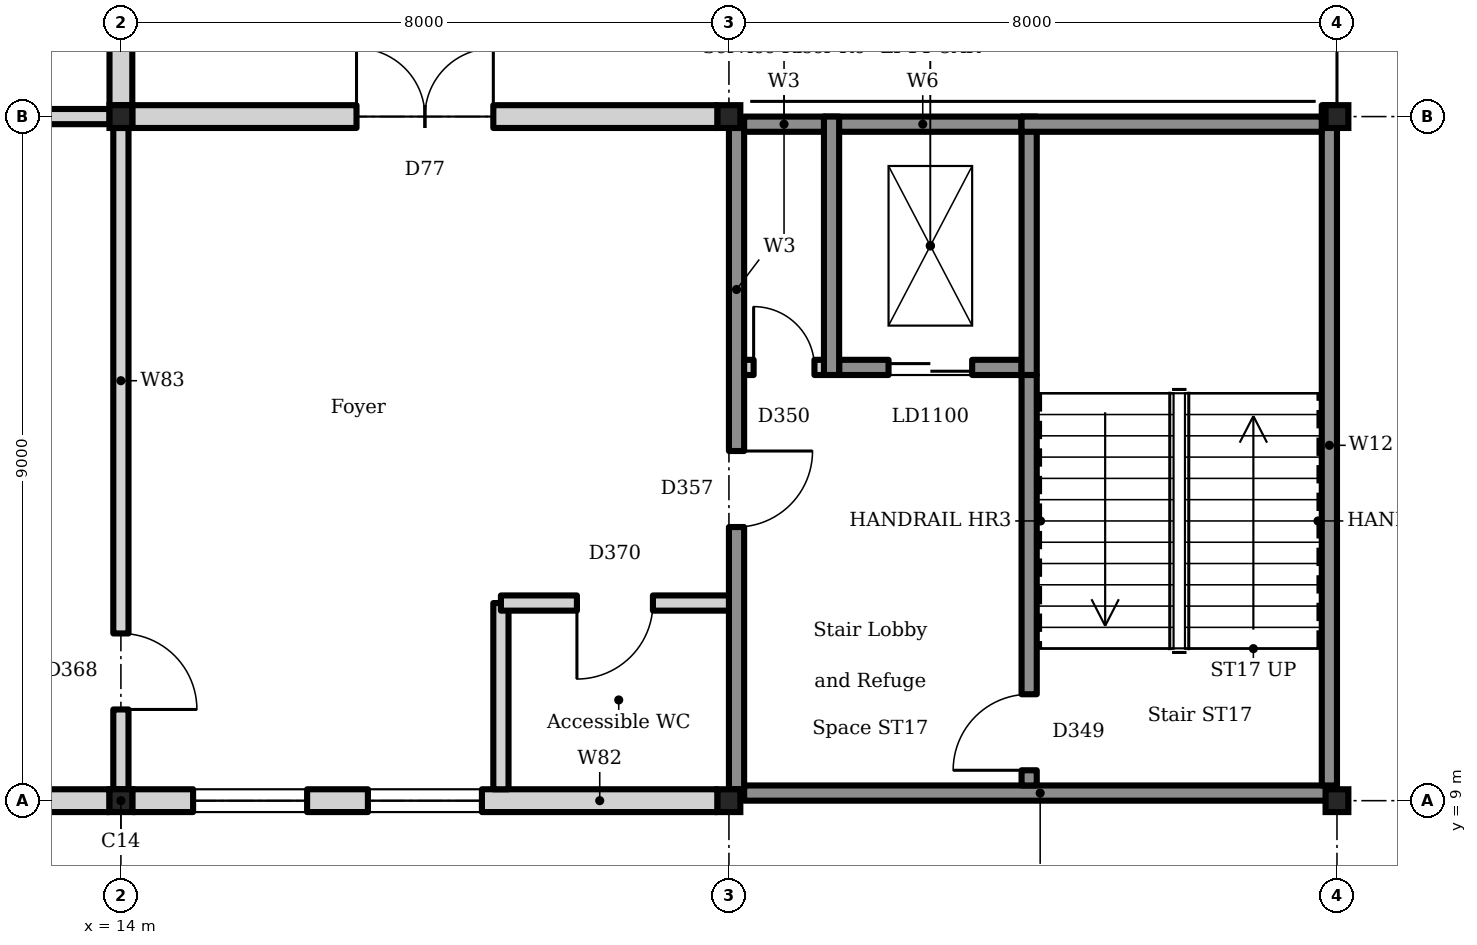
"""IFC4 building model, lengths in metres.
Left out: names, types, materials, properties, quantities, classifications, styles, units other than length and angle.
Written with IfcOpenShell. Run it as: python <this file> out.ifc"""

import sys

from ifc_helpers import new_model, si_unit, direction, frame, frame_2d, origin, origin_2d, place, context, subcontext, project, spatial, rectangle, i_section, extrude, element, fill, save


model = new_model("IFC4")
c1 = context("Model", 3, precision=1e-05, world=origin(), true_north=direction((0.0, 1.0)))
c2 = subcontext(c1, "Body", "Model", "MODEL_VIEW")
j1 = project(units=[si_unit("LENGTHUNIT", "METRE"), si_unit("PLANEANGLEUNIT", "RADIAN")], contexts=[c1])
p1 = place(None, origin())
s1 = spatial("IfcSite", under=j1, at=p1, CompositionType="ELEMENT")
p2 = place(p1, origin())
s2 = spatial("IfcBuilding", under=s1, at=p2, CompositionType="ELEMENT")
p3 = place(p2, frame((0.0, 0.0, 9.9)))
s3 = spatial("IfcBuildingStorey", under=s2, at=p3, CompositionType="ELEMENT", Elevation=9.9)
p4 = place(p3, frame((23.25, 17.9, 0.0), z_axis=(0.0, 0.0, 1.0), x_axis=(1.0, 0.0, 0.0)))
e1 = element("IfcWall", 1, at=p4, inside=s3, PredefinedType="SOLIDWALL", context=c2, shape_type="SweptSolid", body=[
    extrude(rectangle(XDim=2.6, YDim=0.2, at=frame_2d((1.3, 0.0))), origin(), (0.0, 0.0, 1.0), 4.5),
])
p5 = place(p3, frame((23.45, 14.7, 0.0), z_axis=(0.0, 0.0, 1.0), x_axis=(1.0, 0.0, 0.0)))
e2 = element("IfcWall", 2, at=p5, inside=s3, PredefinedType="SOLIDWALL", context=c2, shape_type="SweptSolid", body=[
    extrude(rectangle(XDim=2.4, YDim=0.2, at=frame_2d((1.2, 0.0))), origin(), (0.0, 0.0, 1.0), 4.5),
])
p6 = place(p5, frame((0.65, 0.0, 0.0)))
e3 = element("IfcOpeningElement", 3, at=p6, cuts=e2, PredefinedType="OPENING", context=c2, shape_type="SweptSolid", body=[
    extrude(rectangle(XDim=1.1, YDim=2.1, at=frame_2d((0.55, 1.05))), frame((0.0, 0.11, 0.0), z_axis=(0.0, -1.0, 0.0), x_axis=(1.0, 0.0, 0.0)), (0.0, 0.0, 1.0), 0.22),
])
for number, where, z_axis, x_axis in (
    (4, (23.35, 14.6, 0.0), (0.0, 0.0, 1.0), (0.0, 1.0, 0.0)),
    (5, (25.95, 14.6, 0.0), (0.0, 0.0, 1.0), (0.0, 1.0, 0.0)),
):
    element("IfcWall", number, at=place(p3, frame(where, z_axis=z_axis, x_axis=x_axis)), inside=s3, PredefinedType="SOLIDWALL", context=c2, shape_type="SweptSolid", body=[
        extrude(rectangle(XDim=3.4, YDim=0.2, at=frame_2d((1.7, 0.0))), origin(), (0.0, 0.0, 1.0), 4.5),
    ])
for number, where, z_axis, x_axis in (
    (6, (14.0, 9.0, 0.0), (0.0, 0.0, 1.0), (1.0, 0.0, 0.0)),
    (7, (14.0, 18.0, 0.0), (0.0, 0.0, 1.0), (1.0, 0.0, 0.0)),
):
    element("IfcColumn", number, at=place(p3, frame(where, z_axis=z_axis, x_axis=x_axis)), inside=s3, PredefinedType="COLUMN", context=c2, shape_type="SweptSolid", body=[
        extrude(i_section(OverallWidth=0.3, OverallDepth=0.3, WebThickness=0.011, FlangeThickness=0.019, FilletRadius=0.027, at=origin_2d()), origin(), (0.0, 0.0, 1.0), 4.3),
    ])
for number, where, z_axis, x_axis in (
    (8, (22.0, 9.0, 0.0), (0.0, 0.0, 1.0), (1.0, 0.0, 0.0)),
    (9, (22.0, 18.0, 0.0), (0.0, 0.0, 1.0), (1.0, 0.0, 0.0)),
    (10, (30.0, 9.0, 0.0), (0.0, 0.0, 1.0), (1.0, 0.0, 0.0)),
    (11, (30.0, 18.0, 0.0), (0.0, 0.0, 1.0), (1.0, 0.0, 0.0)),
):
    element("IfcColumn", number, at=place(p3, frame(where, z_axis=z_axis, x_axis=x_axis)), inside=s3, PredefinedType="COLUMN", context=c2, shape_type="SweptSolid", body=[
        extrude(i_section(OverallWidth=0.3, OverallDepth=0.3, WebThickness=0.011, FlangeThickness=0.019, FilletRadius=0.027, at=origin_2d()), origin(), (0.0, 0.0, 1.0), 4.5),
    ])
p7 = place(p3, frame((6.15, 9.0, 0.0), z_axis=(0.0, 0.0, 1.0), x_axis=(1.0, 0.0, 0.0)))
e12 = element("IfcWall", 12, at=p7, inside=s3, PredefinedType="SOLIDWALL", context=c2, shape_type="SweptSolid", body=[
    extrude(rectangle(XDim=7.7, YDim=0.3, at=frame_2d((3.85, 0.0))), origin(), (0.0, 0.0, 1.0), 3.93),
])
p8 = place(p7, frame((0.8, 0.0, 1.1)))
e13 = element("IfcOpeningElement", 13, at=p8, cuts=e12, PredefinedType="OPENING", context=c2, shape_type="SweptSolid", body=[
    extrude(rectangle(XDim=1.5, YDim=2.4, at=frame_2d((0.75, 1.2))), frame((0.0, 0.16, 0.0), z_axis=(0.0, -1.0, 0.0), x_axis=(1.0, 0.0, 0.0)), (0.0, 0.0, 1.0), 0.32),
])
p9 = place(p7, frame((3.1, 0.0, 1.1)))
e14 = element("IfcOpeningElement", 14, at=p9, cuts=e12, PredefinedType="OPENING", context=c2, shape_type="SweptSolid", body=[
    extrude(rectangle(XDim=1.5, YDim=2.4, at=frame_2d((0.75, 1.2))), frame((0.0, 0.16, 0.0), z_axis=(0.0, -1.0, 0.0), x_axis=(1.0, 0.0, 0.0)), (0.0, 0.0, 1.0), 0.32),
])
p10 = place(p7, frame((5.4, 0.0, 1.1)))
e15 = element("IfcOpeningElement", 15, at=p10, cuts=e12, PredefinedType="OPENING", context=c2, shape_type="SweptSolid", body=[
    extrude(rectangle(XDim=1.5, YDim=2.4, at=frame_2d((0.75, 1.2))), frame((0.0, 0.16, 0.0), z_axis=(0.0, -1.0, 0.0), x_axis=(1.0, 0.0, 0.0)), (0.0, 0.0, 1.0), 0.32),
])
p11 = place(p3, frame((14.15, 9.0, 0.0), z_axis=(0.0, 0.0, 1.0), x_axis=(1.0, 0.0, 0.0)))
e16 = element("IfcWall", 16, at=p11, inside=s3, PredefinedType="SOLIDWALL", context=c2, shape_type="SweptSolid", body=[
    extrude(rectangle(XDim=7.7, YDim=0.3, at=frame_2d((3.85, 0.0))), origin(), (0.0, 0.0, 1.0), 3.93),
])
p12 = place(p11, frame((0.8, 0.0, 1.1)))
e17 = element("IfcOpeningElement", 17, at=p12, cuts=e16, PredefinedType="OPENING", context=c2, shape_type="SweptSolid", body=[
    extrude(rectangle(XDim=1.5, YDim=2.4, at=frame_2d((0.75, 1.2))), frame((0.0, 0.16, 0.0), z_axis=(0.0, -1.0, 0.0), x_axis=(1.0, 0.0, 0.0)), (0.0, 0.0, 1.0), 0.32),
])
p13 = place(p11, frame((3.1, 0.0, 1.1)))
e18 = element("IfcOpeningElement", 18, at=p13, cuts=e16, PredefinedType="OPENING", context=c2, shape_type="SweptSolid", body=[
    extrude(rectangle(XDim=1.5, YDim=2.4, at=frame_2d((0.75, 1.2))), frame((0.0, 0.16, 0.0), z_axis=(0.0, -1.0, 0.0), x_axis=(1.0, 0.0, 0.0)), (0.0, 0.0, 1.0), 0.32),
])
p14 = place(p3, frame((14.0, 18.15, 0.0), z_axis=(0.0, 0.0, 1.0), x_axis=(0.0, 1.0, 0.0)))
e19 = element("IfcWall", 19, at=p14, inside=s3, PredefinedType="SOLIDWALL", context=c2, shape_type="SweptSolid", body=[
    extrude(rectangle(XDim=8.7, YDim=0.3, at=frame_2d((4.35, 0.0))), origin(), (0.0, 0.0, 1.0), 3.93),
])
p15 = place(p14, frame((1.05, 0.0, 1.1)))
e20 = element("IfcOpeningElement", 20, at=p15, cuts=e19, PredefinedType="OPENING", context=c2, shape_type="SweptSolid", body=[
    extrude(rectangle(XDim=1.5, YDim=2.4, at=frame_2d((0.75, 1.2))), frame((0.0, 0.16, 0.0), z_axis=(0.0, -1.0, 0.0), x_axis=(1.0, 0.0, 0.0)), (0.0, 0.0, 1.0), 0.32),
])
p16 = place(p14, frame((3.6, 0.0, 1.1)))
e21 = element("IfcOpeningElement", 21, at=p16, cuts=e19, PredefinedType="OPENING", context=c2, shape_type="SweptSolid", body=[
    extrude(rectangle(XDim=1.5, YDim=2.4, at=frame_2d((0.75, 1.2))), frame((0.0, 0.16, 0.0), z_axis=(0.0, -1.0, 0.0), x_axis=(1.0, 0.0, 0.0)), (0.0, 0.0, 1.0), 0.32),
])
p17 = place(p14, frame((6.15, 0.0, 1.1)))
e22 = element("IfcOpeningElement", 22, at=p17, cuts=e19, PredefinedType="OPENING", context=c2, shape_type="SweptSolid", body=[
    extrude(rectangle(XDim=1.5, YDim=2.4, at=frame_2d((0.75, 1.2))), frame((0.0, 0.16, 0.0), z_axis=(0.0, -1.0, 0.0), x_axis=(1.0, 0.0, 0.0)), (0.0, 0.0, 1.0), 0.32),
])
p18 = place(p3, frame((14.15, 18.0, 0.0), z_axis=(0.0, 0.0, 1.0), x_axis=(1.0, 0.0, 0.0)))
e23 = element("IfcWall", 23, at=p18, inside=s3, PredefinedType="SOLIDWALL", context=c2, shape_type="SweptSolid", body=[
    extrude(rectangle(XDim=7.7, YDim=0.3, at=frame_2d((3.85, 0.0))), origin(), (0.0, 0.0, 1.0), 3.93),
])
p19 = place(p18, frame((2.95, 0.0, 0.0)))
e24 = element("IfcOpeningElement", 24, at=p19, cuts=e23, PredefinedType="OPENING", context=c2, shape_type="SweptSolid", body=[
    extrude(rectangle(XDim=1.8, YDim=2.4, at=frame_2d((0.9, 1.2))), frame((0.0, 0.16, 0.0), z_axis=(0.0, -1.0, 0.0), x_axis=(1.0, 0.0, 0.0)), (0.0, 0.0, 1.0), 0.32),
])
p20 = place(p3, frame((22.2, 9.1, 0.0), z_axis=(0.0, 0.0, 1.0), x_axis=(1.0, 0.0, 0.0)))
e25 = element("IfcWall", 25, at=p20, inside=s3, PredefinedType="SOLIDWALL", context=c2, shape_type="SweptSolid", body=[
    extrude(rectangle(XDim=7.79, YDim=0.2, at=frame_2d((3.895, 0.0))), origin(), (0.0, 0.0, 1.0), 4.3),
])
p21 = place(p3, frame((29.9, 9.2, 0.0), z_axis=(0.0, 0.0, 1.0), x_axis=(0.0, 1.0, 0.0)))
e26 = element("IfcWall", 26, at=p21, inside=s3, PredefinedType="SOLIDWALL", context=c2, shape_type="SweptSolid", body=[
    extrude(rectangle(XDim=8.95, YDim=0.2, at=frame_2d((4.475, 0.0))), origin(), (0.0, 0.0, 1.0), 4.3),
])
p22 = place(p3, frame((22.1, 9.15, 0.0), z_axis=(0.0, 0.0, 1.0), x_axis=(0.0, 1.0, 0.0)))
e27 = element("IfcWall", 27, at=p22, inside=s3, PredefinedType="SOLIDWALL", context=c2, shape_type="SweptSolid", body=[
    extrude(rectangle(XDim=8.7, YDim=0.2, at=frame_2d((4.35, 0.0))), origin(), (0.0, 0.0, 1.0), 4.3),
])
p23 = place(p22, frame((3.45, 0.0, 0.0)))
e28 = element("IfcOpeningElement", 28, at=p23, cuts=e27, PredefinedType="OPENING", context=c2, shape_type="SweptSolid", body=[
    extrude(rectangle(XDim=1.0, YDim=2.1, at=frame_2d((0.5, 1.05))), frame((0.0, 0.11, 0.0), z_axis=(0.0, -1.0, 0.0), x_axis=(1.0, 0.0, 0.0)), (0.0, 0.0, 1.0), 0.22),
])
p24 = place(p3, frame((22.2, 17.9, 0.0), z_axis=(0.0, 0.0, 1.0), x_axis=(1.0, 0.0, 0.0)))
e29 = element("IfcWall", 29, at=p24, inside=s3, PredefinedType="SOLIDWALL", context=c2, shape_type="SweptSolid", body=[
    extrude(rectangle(XDim=1.05, YDim=0.2, at=frame_2d((0.525, 0.0))), origin(), (0.0, 0.0, 1.0), 4.3),
])
p25 = place(p3, frame((25.85, 17.9, 0.0), z_axis=(0.0, 0.0, 1.0), x_axis=(1.0, 0.0, 0.0)))
e30 = element("IfcWall", 30, at=p25, inside=s3, PredefinedType="SOLIDWALL", context=c2, shape_type="SweptSolid", body=[
    extrude(rectangle(XDim=3.95, YDim=0.2, at=frame_2d((1.975, 0.0))), origin(), (0.0, 0.0, 1.0), 4.3),
])
p26 = place(p3, frame((25.95, 9.2, 0.0), z_axis=(0.0, 0.0, 1.0), x_axis=(0.0, 1.0, 0.0)))
e31 = element("IfcWall", 31, at=p26, inside=s3, PredefinedType="SOLIDWALL", context=c2, shape_type="SweptSolid", body=[
    extrude(rectangle(XDim=5.4, YDim=0.2, at=frame_2d((2.7, 0.0))), origin(), (0.0, 0.0, 1.0), 4.3),
])
p27 = place(p26, frame((0.2, 0.0, 0.0)))
e32 = element("IfcOpeningElement", 32, at=p27, cuts=e31, PredefinedType="OPENING", context=c2, shape_type="SweptSolid", body=[
    extrude(rectangle(XDim=1.0, YDim=2.1, at=frame_2d((0.5, 1.05))), frame((0.0, 0.11, 0.0), z_axis=(0.0, -1.0, 0.0), x_axis=(1.0, 0.0, 0.0)), (0.0, 0.0, 1.0), 0.22),
])
p28 = place(p3, frame((22.2, 14.7, 0.0), z_axis=(0.0, 0.0, 1.0), x_axis=(1.0, 0.0, 0.0)))
e33 = element("IfcWall", 33, at=p28, inside=s3, PredefinedType="SOLIDWALL", context=c2, shape_type="SweptSolid", body=[
    extrude(rectangle(XDim=1.05, YDim=0.2, at=frame_2d((0.525, 0.0))), origin(), (0.0, 0.0, 1.0), 4.3),
])
p29 = place(p28, frame((0.125, 0.0, 0.0)))
e34 = element("IfcOpeningElement", 34, at=p29, cuts=e33, PredefinedType="OPENING", context=c2, shape_type="SweptSolid", body=[
    extrude(rectangle(XDim=0.8, YDim=2.1, at=frame_2d((0.4, 1.05))), frame((0.0, 0.11, 0.0), z_axis=(0.0, -1.0, 0.0), x_axis=(1.0, 0.0, 0.0)), (0.0, 0.0, 1.0), 0.22),
])
p30 = place(p3, frame((6.15, 18.0, 0.0), z_axis=(0.0, 0.0, 1.0), x_axis=(1.0, 0.0, 0.0)))
e35 = element("IfcWall", 35, at=p30, inside=s3, PredefinedType="PARTITIONING", context=c2, shape_type="SweptSolid", body=[
    extrude(rectangle(XDim=7.7, YDim=0.2, at=frame_2d((3.85, 0.0))), origin(), (0.0, 0.0, 1.0), 3.93),
])
p31 = place(p3, frame((14.0, 9.15, 0.0), z_axis=(0.0, 0.0, 1.0), x_axis=(0.0, 1.0, 0.0)))
e36 = element("IfcWall", 36, at=p31, inside=s3, PredefinedType="PARTITIONING", context=c2, shape_type="SweptSolid", body=[
    extrude(rectangle(XDim=8.7, YDim=0.2, at=frame_2d((4.35, 0.0))), origin(), (0.0, 0.0, 1.0), 3.93),
])
p32 = place(p31, frame((1.05, 0.0, 0.0)))
e37 = element("IfcOpeningElement", 37, at=p32, cuts=e36, PredefinedType="OPENING", context=c2, shape_type="SweptSolid", body=[
    extrude(rectangle(XDim=1.0, YDim=2.1, at=frame_2d((0.5, 1.05))), frame((0.0, 0.11, 0.0), z_axis=(0.0, -1.0, 0.0), x_axis=(1.0, 0.0, 0.0)), (0.0, 0.0, 1.0), 0.22),
])
p33 = place(p3, frame((19.0, 9.15, 0.0), z_axis=(0.0, 0.0, 1.0), x_axis=(0.0, 1.0, 0.0)))
e38 = element("IfcWall", 38, at=p33, inside=s3, PredefinedType="PARTITIONING", context=c2, shape_type="SweptSolid", body=[
    extrude(rectangle(XDim=2.45, YDim=0.2, at=frame_2d((1.225, 0.0))), origin(), (0.0, 0.0, 1.0), 4.3),
])
p34 = place(p3, frame((19.0, 11.6, 0.0), z_axis=(0.0, 0.0, 1.0), x_axis=(1.0, 0.0, 0.0)))
e39 = element("IfcWall", 39, at=p34, inside=s3, PredefinedType="PARTITIONING", context=c2, shape_type="SweptSolid", body=[
    extrude(rectangle(XDim=3.0, YDim=0.2, at=frame_2d((1.5, 0.0))), origin(), (0.0, 0.0, 1.0), 4.3),
])
p35 = place(p34, frame((1.0, 0.0, 0.0)))
e40 = element("IfcOpeningElement", 40, at=p35, cuts=e39, PredefinedType="OPENING", context=c2, shape_type="SweptSolid", body=[
    extrude(rectangle(XDim=1.0, YDim=2.1, at=frame_2d((0.5, 1.05))), frame((0.0, 0.11, 0.0), z_axis=(0.0, -1.0, 0.0), x_axis=(1.0, 0.0, 0.0)), (0.0, 0.0, 1.0), 0.22),
])
p36 = place(p6, origin())
e41 = element("IfcDoor", 41, at=p36, inside=s3, OperationType="SLIDING_TO_LEFT", PredefinedType="DOOR", context=c2, shape_type="SweptSolid", body=[
    extrude(rectangle(XDim=1.1, YDim=2.1, at=frame_2d((0.55, 1.05))), frame((0.0, 0.025, 0.0), z_axis=(0.0, -1.0, 0.0), x_axis=(1.0, 0.0, 0.0)), (0.0, 0.0, 1.0), 0.05),
])
fill(e3, e41)
p37 = place(p12, origin())
e42 = element("IfcWindow", 42, at=p37, inside=s3, PartitioningType="SINGLE_PANEL", PredefinedType="WINDOW", context=c2, shape_type="SweptSolid", body=[
    extrude(rectangle(XDim=1.5, YDim=2.4, at=frame_2d((0.75, 1.2))), frame((0.0, 0.03, 0.0), z_axis=(0.0, -1.0, 0.0), x_axis=(1.0, 0.0, 0.0)), (0.0, 0.0, 1.0), 0.06),
])
fill(e17, e42)
p38 = place(p13, origin())
e43 = element("IfcWindow", 43, at=p38, inside=s3, PartitioningType="SINGLE_PANEL", PredefinedType="WINDOW", context=c2, shape_type="SweptSolid", body=[
    extrude(rectangle(XDim=1.5, YDim=2.4, at=frame_2d((0.75, 1.2))), frame((0.0, 0.03, 0.0), z_axis=(0.0, -1.0, 0.0), x_axis=(1.0, 0.0, 0.0)), (0.0, 0.0, 1.0), 0.06),
])
fill(e18, e43)
p39 = place(p19, origin())
e44 = element("IfcDoor", 44, at=p39, inside=s3, OperationType="DOUBLE_DOOR_SINGLE_SWING", PredefinedType="DOOR", context=c2, shape_type="SweptSolid", body=[
    extrude(rectangle(XDim=1.8, YDim=2.4, at=frame_2d((0.9, 1.2))), frame((0.0, 0.025, 0.0), z_axis=(0.0, -1.0, 0.0), x_axis=(1.0, 0.0, 0.0)), (0.0, 0.0, 1.0), 0.05),
])
fill(e24, e44)
p40 = place(p27, origin())
e45 = element("IfcDoor", 45, at=p40, inside=s3, OperationType="SINGLE_SWING_RIGHT", PredefinedType="DOOR", context=c2, shape_type="SweptSolid", body=[
    extrude(rectangle(XDim=1.0, YDim=2.1, at=frame_2d((0.5, 1.05))), frame((0.0, 0.025, 0.0), z_axis=(0.0, -1.0, 0.0), x_axis=(1.0, 0.0, 0.0)), (0.0, 0.0, 1.0), 0.05),
])
fill(e32, e45)
p41 = place(p29, origin())
e46 = element("IfcDoor", 46, at=p41, inside=s3, OperationType="SINGLE_SWING_RIGHT", PredefinedType="DOOR", context=c2, shape_type="SweptSolid", body=[
    extrude(rectangle(XDim=0.8, YDim=2.1, at=frame_2d((0.4, 1.05))), frame((0.0, 0.025, 0.0), z_axis=(0.0, -1.0, 0.0), x_axis=(1.0, 0.0, 0.0)), (0.0, 0.0, 1.0), 0.05),
])
fill(e34, e46)
p42 = place(p23, frame((1.0, 0.0, 0.0), z_axis=(0.0, 0.0, 1.0), x_axis=(-1.0, 0.0, 0.0)))
e47 = element("IfcDoor", 47, at=p42, inside=s3, OperationType="SINGLE_SWING_RIGHT", PredefinedType="DOOR", context=c2, shape_type="SweptSolid", body=[
    extrude(rectangle(XDim=1.0, YDim=2.1, at=frame_2d((0.5, 1.05))), frame((0.0, 0.025, 0.0), z_axis=(0.0, -1.0, 0.0), x_axis=(1.0, 0.0, 0.0)), (0.0, 0.0, 1.0), 0.05),
])
fill(e28, e47)
p43 = place(p32, frame((1.0, 0.0, 0.0), z_axis=(0.0, 0.0, 1.0), x_axis=(-1.0, 0.0, 0.0)))
e48 = element("IfcDoor", 48, at=p43, inside=s3, OperationType="SINGLE_SWING_LEFT", PredefinedType="DOOR", context=c2, shape_type="SweptSolid", body=[
    extrude(rectangle(XDim=1.0, YDim=2.1, at=frame_2d((0.5, 1.05))), frame((0.0, 0.025, 0.0), z_axis=(0.0, -1.0, 0.0), x_axis=(1.0, 0.0, 0.0)), (0.0, 0.0, 1.0), 0.05),
])
fill(e37, e48)
p44 = place(p35, frame((1.0, 0.0, 0.0), z_axis=(0.0, 0.0, 1.0), x_axis=(-1.0, 0.0, 0.0)))
e49 = element("IfcDoor", 49, at=p44, inside=s3, OperationType="SINGLE_SWING_LEFT", PredefinedType="DOOR", context=c2, shape_type="SweptSolid", body=[
    extrude(rectangle(XDim=1.0, YDim=2.1, at=frame_2d((0.5, 1.05))), frame((0.0, 0.025, 0.0), z_axis=(0.0, -1.0, 0.0), x_axis=(1.0, 0.0, 0.0)), (0.0, 0.0, 1.0), 0.05),
])
fill(e40, e49)
save(model, sys.argv[1])
